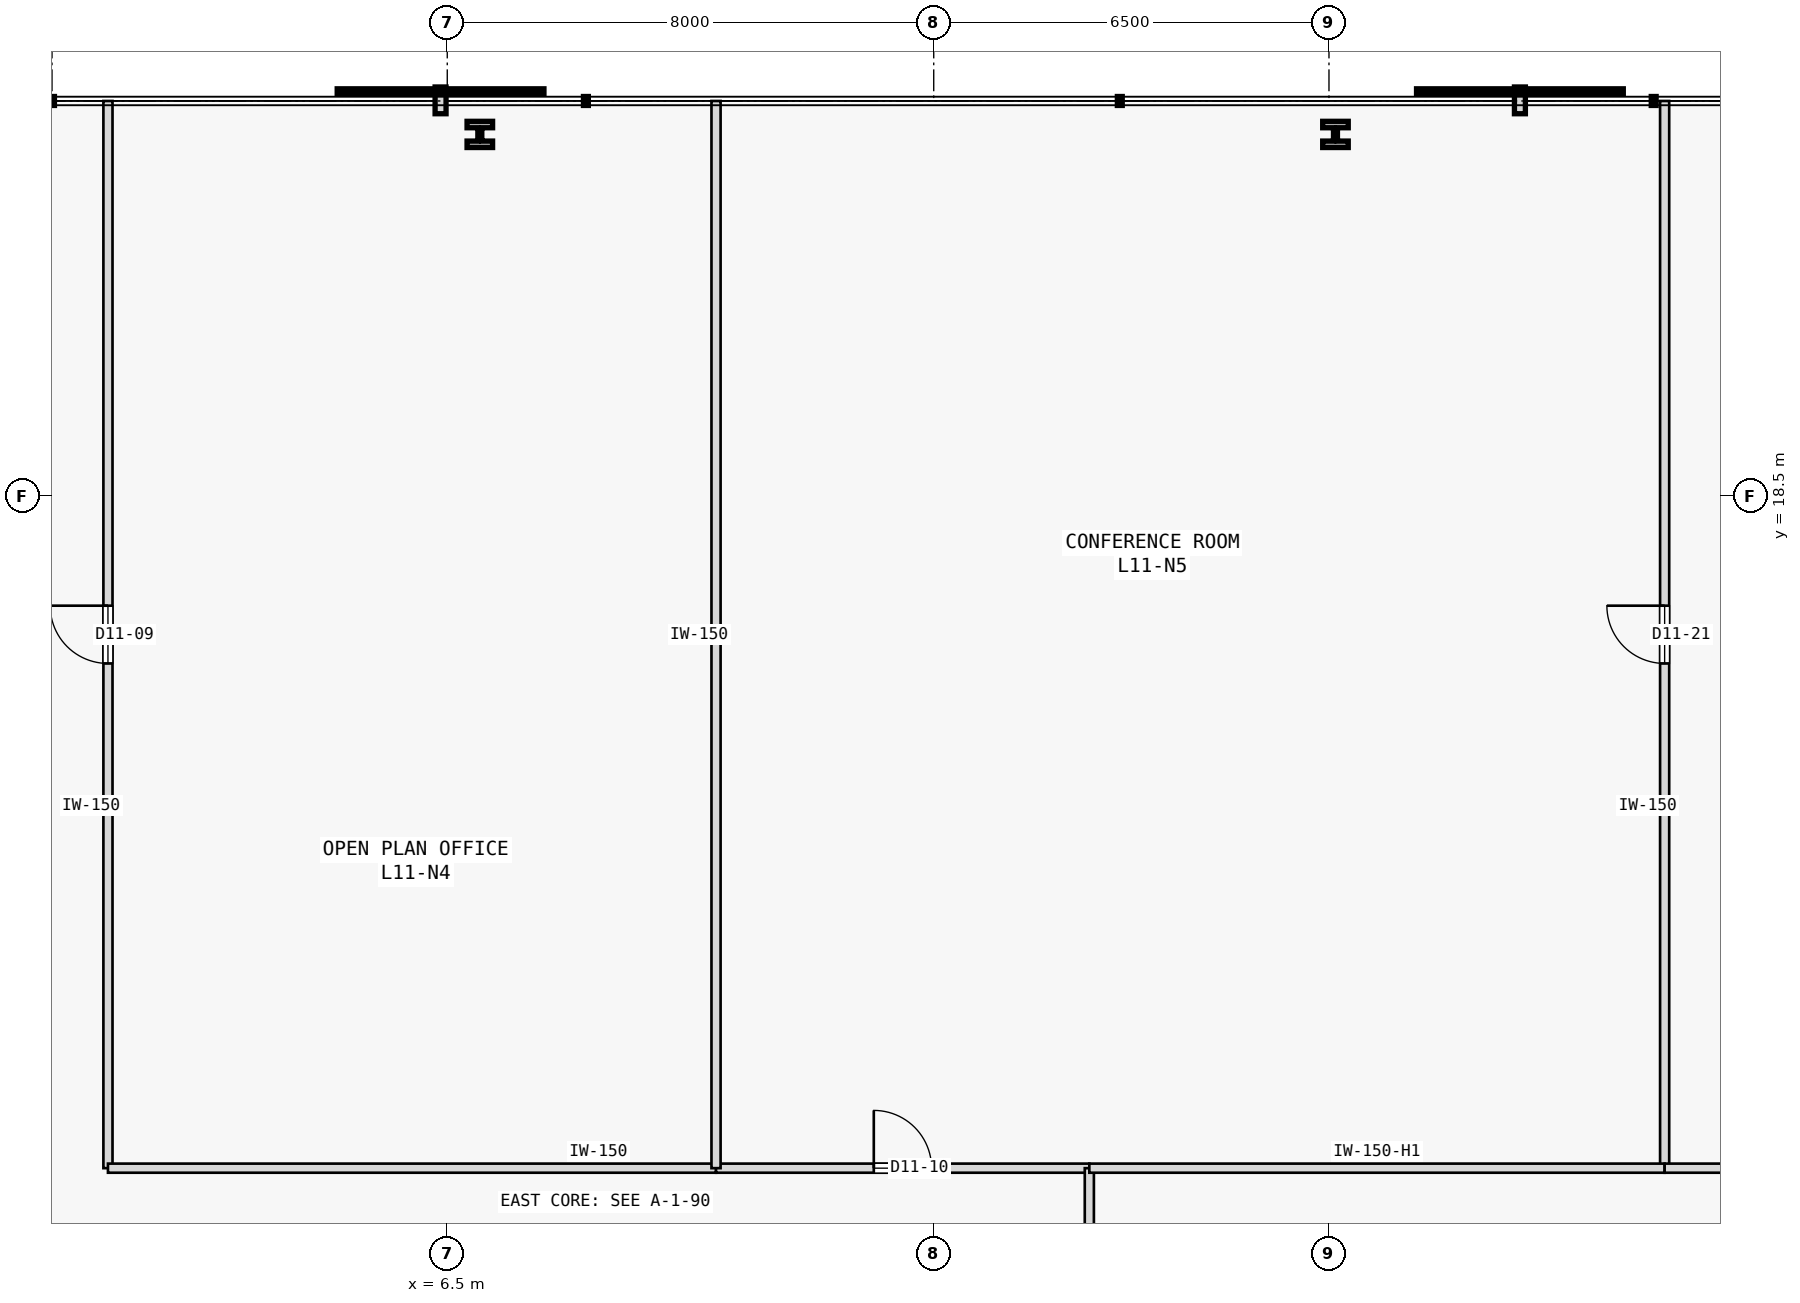
"""IFC4 building model, lengths in metres.
Left out: names, types, materials, properties, quantities, classifications, styles, units other than length and angle.
Written with IfcOpenShell. Run it as: python <this file> out.ifc"""

import sys

from ifc_helpers import new_model, si_unit, direction, frame, frame_2d, origin, origin_2d, place, context, subcontext, project, spatial, rectangle, i_section, extrude, element, fill, save


model = new_model("IFC4")
c1 = context("Model", 3, precision=1e-05, world=origin(), true_north=direction((0.0, 1.0)))
c2 = subcontext(c1, "Body", "Model", "MODEL_VIEW")
j1 = project(units=[si_unit("LENGTHUNIT", "METRE"), si_unit("PLANEANGLEUNIT", "RADIAN")], contexts=[c1])
p1 = place(None, origin())
s1 = spatial("IfcSite", under=j1, at=p1, CompositionType="ELEMENT")
p2 = place(p1, origin())
s2 = spatial("IfcBuilding", under=s1, at=p2, CompositionType="ELEMENT")
p3 = place(p2, frame((0.0, 0.0, 48.4)))
s3 = spatial("IfcBuildingStorey", under=s2, at=p3, CompositionType="ELEMENT", Elevation=48.4)
for number, where, z_axis, x_axis in (
    (1, (21.107, 24.45, 0.0), (0.0, 0.0, 1.0), (1.0, 0.0, 0.0)),
    (2, (7.036, 24.45, 0.0), (0.0, 0.0, 1.0), (1.0, 0.0, 0.0)),
):
    element("IfcColumn", number, at=place(p3, frame(where, z_axis=z_axis, x_axis=x_axis)), inside=s3, PredefinedType="COLUMN", context=c2, shape_type="SweptSolid", body=[
        extrude(i_section(OverallWidth=0.42, OverallDepth=0.431, WebThickness=0.065, FlangeThickness=0.106, FilletRadius=0.015, at=origin_2d()), origin(), (0.0, 0.0, 1.0), 3.8),
    ])
p4 = place(p3, frame((0.92, 7.45, 0.0), z_axis=(0.0, 0.0, 1.0), x_axis=(0.0, 1.0, 0.0)))
e3 = element("IfcWall", 3, at=p4, inside=s3, PredefinedType="PARTITIONING", context=c2, shape_type="SweptSolid", body=[
    extrude(rectangle(XDim=17.55, YDim=0.15, at=frame_2d((8.775, 0.0))), origin(), (0.0, 0.0, 1.0), 3.575),
])
p5 = place(p4, frame((8.3, 0.0, 0.0)))
e4 = element("IfcOpeningElement", 4, at=p5, cuts=e3, PredefinedType="OPENING", context=c2, shape_type="SweptSolid", body=[
    extrude(rectangle(XDim=0.95, YDim=2.15, at=frame_2d((0.475, 1.075))), frame((0.0, 0.085, 0.0), z_axis=(0.0, -1.0, 0.0), x_axis=(1.0, 0.0, 0.0)), (0.0, 0.0, 1.0), 0.17),
])
p6 = place(p3, frame((0.92, 7.45, 0.0), z_axis=(0.0, 0.0, 1.0), x_axis=(1.0, 0.0, 0.0)))
e5 = element("IfcWall", 5, at=p6, inside=s3, PredefinedType="PARTITIONING", context=c2, shape_type="SweptSolid", body=[
    extrude(rectangle(XDim=10.0, YDim=0.15, at=frame_2d((5.0, 0.0))), origin(), (0.0, 0.0, 1.0), 3.575),
])
p7 = place(p3, frame((10.92, 7.45, 0.0), z_axis=(0.0, 0.0, 1.0), x_axis=(1.0, 0.0, 0.0)))
e6 = element("IfcWall", 6, at=p7, inside=s3, PredefinedType="PARTITIONING", context=c2, shape_type="SweptSolid", body=[
    extrude(rectangle(XDim=6.139, YDim=0.15, at=frame_2d((3.07, 0.0))), origin(), (0.0, 0.0, 1.0), 3.575),
])
p8 = place(p7, frame((2.594, 0.0, 0.0)))
e7 = element("IfcOpeningElement", 7, at=p8, cuts=e6, PredefinedType="OPENING", context=c2, shape_type="SweptSolid", body=[
    extrude(rectangle(XDim=0.95, YDim=2.15, at=frame_2d((0.475, 1.075))), frame((0.0, 0.085, 0.0), z_axis=(0.0, -1.0, 0.0), x_axis=(1.0, 0.0, 0.0)), (0.0, 0.0, 1.0), 0.17),
])
p9 = place(p3, frame((17.059, 2.384, 0.0), z_axis=(0.0, 0.0, 1.0), x_axis=(0.0, 1.0, 0.0)))
e8 = element("IfcWall", 8, at=p9, inside=s3, PredefinedType="PARTITIONING", context=c2, shape_type="SweptSolid", body=[
    extrude(rectangle(XDim=5.066, YDim=0.15, at=frame_2d((2.533, 0.0))), origin(), (0.0, 0.0, 1.0), 3.575),
])
p10 = place(p9, frame((0.639, 0.0, 0.0)))
e9 = element("IfcOpeningElement", 9, at=p10, cuts=e8, PredefinedType="OPENING", context=c2, shape_type="SweptSolid", body=[
    extrude(rectangle(XDim=0.95, YDim=2.15, at=frame_2d((0.475, 1.075))), frame((0.0, 0.085, 0.0), z_axis=(0.0, -1.0, 0.0), x_axis=(1.0, 0.0, 0.0)), (0.0, 0.0, 1.0), 0.17),
])
p11 = place(p3, frame((10.92, 7.45, 0.0), z_axis=(0.0, 0.0, 1.0), x_axis=(0.0, 1.0, 0.0)))
e10 = element("IfcWall", 10, at=p11, inside=s3, PredefinedType="PARTITIONING", context=c2, shape_type="SweptSolid", body=[
    extrude(rectangle(XDim=17.55, YDim=0.15, at=frame_2d((8.775, 0.0))), origin(), (0.0, 0.0, 1.0), 3.575),
])
p12 = place(p3, frame((26.52, 7.45, 0.0), z_axis=(0.0, 0.0, 1.0), x_axis=(0.0, 1.0, 0.0)))
e11 = element("IfcWall", 11, at=p12, inside=s3, PredefinedType="PARTITIONING", context=c2, shape_type="SweptSolid", body=[
    extrude(rectangle(XDim=17.55, YDim=0.15, at=frame_2d((8.775, 0.0))), origin(), (0.0, 0.0, 1.0), 3.575),
])
p13 = place(p12, frame((8.3, 0.0, 0.0)))
e12 = element("IfcOpeningElement", 12, at=p13, cuts=e11, PredefinedType="OPENING", context=c2, shape_type="SweptSolid", body=[
    extrude(rectangle(XDim=0.95, YDim=2.15, at=frame_2d((0.475, 1.075))), frame((0.0, 0.085, 0.0), z_axis=(0.0, -1.0, 0.0), x_axis=(1.0, 0.0, 0.0)), (0.0, 0.0, 1.0), 0.17),
])
p14 = place(p3, frame((17.059, 7.45, 0.0), z_axis=(0.0, 0.0, 1.0), x_axis=(1.0, 0.0, 0.0)))
e13 = element("IfcWall", 13, at=p14, inside=s3, PredefinedType="PARTITIONING", context=c2, shape_type="SweptSolid", body=[
    extrude(rectangle(XDim=9.461, YDim=0.15, at=frame_2d((4.73, 0.0))), origin(), (0.0, 0.0, 1.0), 3.125),
])
p15 = place(p3, frame((26.52, 7.45, 0.0), z_axis=(0.0, 0.0, 1.0), x_axis=(1.0, 0.0, 0.0)))
e14 = element("IfcWall", 14, at=p15, inside=s3, PredefinedType="PARTITIONING", context=c2, shape_type="SweptSolid", body=[
    extrude(rectangle(XDim=12.48, YDim=0.15, at=frame_2d((6.24, 0.0))), origin(), (0.0, 0.0, 1.0), 3.575),
])
p16 = place(p5, origin())
e15 = element("IfcDoor", 15, at=p16, inside=s3, OperationType="SINGLE_SWING_RIGHT", PredefinedType="DOOR", context=c2, shape_type="SweptSolid", body=[
    extrude(rectangle(XDim=0.95, YDim=2.15, at=frame_2d((0.475, 1.075))), frame((0.0, 0.025, 0.0), z_axis=(0.0, -1.0, 0.0), x_axis=(1.0, 0.0, 0.0)), (0.0, 0.0, 1.0), 0.05),
])
fill(e4, e15)
p17 = place(p8, origin())
e16 = element("IfcDoor", 16, at=p17, inside=s3, OperationType="SINGLE_SWING_LEFT", PredefinedType="DOOR", context=c2, shape_type="SweptSolid", body=[
    extrude(rectangle(XDim=0.95, YDim=2.15, at=frame_2d((0.475, 1.075))), frame((0.0, 0.025, 0.0), z_axis=(0.0, -1.0, 0.0), x_axis=(1.0, 0.0, 0.0)), (0.0, 0.0, 1.0), 0.05),
])
fill(e7, e16)
p18 = place(p13, origin())
e17 = element("IfcDoor", 17, at=p18, inside=s3, OperationType="SINGLE_SWING_RIGHT", PredefinedType="DOOR", context=c2, shape_type="SweptSolid", body=[
    extrude(rectangle(XDim=0.95, YDim=2.15, at=frame_2d((0.475, 1.075))), frame((0.0, 0.025, 0.0), z_axis=(0.0, -1.0, 0.0), x_axis=(1.0, 0.0, 0.0)), (0.0, 0.0, 1.0), 0.05),
])
fill(e12, e17)
save(model, sys.argv[1])
